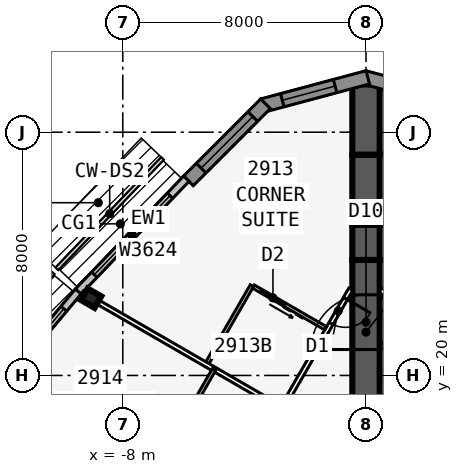
"""IFC4 building model, lengths in metres.
Left out: names, types, materials, properties, quantities, classifications, styles, units other than length and angle.
Written with IfcOpenShell. Run it as: python <this file> out.ifc"""

import sys

from ifc_helpers import new_model, si_unit, direction, frame, frame_2d, origin, origin_2d, place, context, subcontext, project, spatial, polyline, rectangle, i_section, outline, extrude, element, fill, save


model = new_model("IFC4")
c1 = context("Model", 3, precision=1e-05, world=origin(), true_north=direction((0.0, 1.0)))
c2 = subcontext(c1, "Body", "Model", "MODEL_VIEW")
j1 = project(units=[si_unit("LENGTHUNIT", "METRE"), si_unit("PLANEANGLEUNIT", "RADIAN")], contexts=[c1])
p1 = place(None, origin())
s1 = spatial("IfcSite", under=j1, at=p1, CompositionType="ELEMENT")
p2 = place(p1, origin())
s2 = spatial("IfcBuilding", under=s1, at=p2, CompositionType="ELEMENT")
p3 = place(p2, frame((0.0, 0.0, 114.7)))
s3 = spatial("IfcBuildingStorey", under=s2, at=p3, CompositionType="ELEMENT", Elevation=114.7)
p4 = place(p3, frame((0.0, 19.052, 0.0), z_axis=(0.0, 0.0, 1.0), x_axis=(0.0, 1.0, 0.0)))
e1 = element("IfcWall", 1, at=p4, inside=s3, PredefinedType="SHEAR", context=c2, shape_type="SweptSolid", body=[
    extrude(rectangle(XDim=4.746, YDim=0.9, at=frame_2d((2.373, 0.0))), origin(), (0.0, 0.0, 1.0), 3.4),
])
p5 = place(p4, frame((1.8, 0.0, 0.0)))
e2 = element("IfcOpeningElement", 2, at=p5, cuts=e1, PredefinedType="OPENING", context=c2, shape_type="SweptSolid", body=[
    extrude(rectangle(XDim=1.8, YDim=2.13, at=frame_2d((0.9, 1.065))), frame((0.0, 0.46, 0.0), z_axis=(0.0, -1.0, 0.0), x_axis=(1.0, 0.0, 0.0)), (0.0, 0.0, 1.0), 0.92),
])
p6 = place(p3, frame((0.0, 23.799, 0.0), z_axis=(0.0, 0.0, 1.0), x_axis=(0.0, 1.0, 0.0)))
e3 = element("IfcWall", 3, at=p6, inside=s3, PredefinedType="SHEAR", context=c2, shape_type="SweptSolid", body=[
    extrude(rectangle(XDim=1.155, YDim=0.9, at=frame_2d((0.577, 0.0))), origin(), (0.0, 0.0, 1.0), 3.4),
])
p7 = place(p3, frame((0.0, 24.953, 0.0), z_axis=(0.0, 0.0, 1.0), x_axis=(0.0, 1.0, 0.0)))
e4 = element("IfcWall", 4, at=p7, inside=s3, PredefinedType="SHEAR", context=c2, shape_type="SweptSolid", body=[
    extrude(rectangle(XDim=2.309, YDim=0.9, at=frame_2d((1.155, 0.0))), origin(), (0.0, 0.0, 1.0), 3.4),
])
p8 = place(p3, frame((0.0, 27.263, 0.0), z_axis=(0.0, 0.0, 1.0), x_axis=(0.0, 1.0, 0.0)))
e5 = element("IfcWall", 5, at=p8, inside=s3, PredefinedType="SHEAR", context=c2, shape_type="SweptSolid", body=[
    extrude(rectangle(XDim=2.31, YDim=0.9, at=frame_2d((1.155, 0.0))), origin(), (0.0, 0.0, 1.0), 3.4),
])
p9 = place(p3, frame((-9.041, 22.541, 0.0), z_axis=(0.0, 0.0, 1.0), x_axis=(-0.5, -0.866025403784, 0.0)))
e6 = element("IfcColumn", 6, at=p9, inside=s3, PredefinedType="COLUMN", context=c2, shape_type="SweptSolid", body=[
    extrude(i_section(OverallWidth=0.437, OverallDepth=0.513, WebThickness=0.061, FlangeThickness=0.097, at=origin_2d()), origin(), (0.0, 0.0, 1.0), 3.4),
])
p10 = place(p3, frame((3.406, 28.877, 0.0), z_axis=(0.0, 0.0, 1.0), x_axis=(-0.965924653531, 0.258823421857, 0.0)))
e7 = element("IfcWall", 7, at=p10, inside=s3, PredefinedType="SOLIDWALL", context=c2, shape_type="SweptSolid", body=[
    extrude(outline(polyline([(3.586, 0.225), (3.527, 0.225), (3.035, 0.093), (3.0, 0.225), (0.0, 0.225), (0.0, -0.225), (3.586, -0.225), (3.586, 0.225)])), origin(), (0.0, 0.0, 1.0), 3.235),
])
p11 = place(p10, frame((0.675, 0.0, 0.45)))
e8 = element("IfcOpeningElement", 8, at=p11, cuts=e7, PredefinedType="OPENING", context=c2, shape_type="SweptSolid", body=[
    extrude(rectangle(XDim=1.8, YDim=2.4, at=frame_2d((0.9, 1.2))), frame((0.0, 0.235, 0.0), z_axis=(0.0, -1.0, 0.0), x_axis=(1.0, 0.0, 0.0)), (0.0, 0.0, 1.0), 0.47),
])
p12 = place(p3, frame((0.058, 29.805, 0.0), z_axis=(0.0, 0.0, 1.0), x_axis=(-0.965924653531, -0.258823421857, 0.0)))
e9 = element("IfcWall", 9, at=p12, inside=s3, PredefinedType="SOLIDWALL", context=c2, shape_type="SweptSolid", body=[
    extrude(outline(polyline([(3.586, 0.225), (0.586, 0.225), (0.551, 0.093), (0.06, 0.225), (0.0, 0.225), (0.0, -0.225), (3.586, -0.225), (3.586, 0.225)])), origin(), (0.0, 0.0, 1.0), 3.235),
])
p13 = place(p12, frame((1.111, 0.0, 0.45)))
e10 = element("IfcOpeningElement", 10, at=p13, cuts=e9, PredefinedType="OPENING", context=c2, shape_type="SweptSolid", body=[
    extrude(rectangle(XDim=1.8, YDim=2.4, at=frame_2d((0.9, 1.2))), frame((0.0, 0.235, 0.0), z_axis=(0.0, -1.0, 0.0), x_axis=(1.0, 0.0, 0.0)), (0.0, 0.0, 1.0), 0.47),
])
p14 = place(p3, frame((-3.305, 28.935, 0.0), z_axis=(0.0, 0.0, 1.0), x_axis=(-0.707106781187, -0.707106781187, 0.0)))
e11 = element("IfcWall", 11, at=p14, inside=s3, PredefinedType="SOLIDWALL", context=c2, shape_type="SweptSolid", body=[
    extrude(rectangle(XDim=3.586, YDim=0.45, at=frame_2d((1.793, 0.0))), origin(), (0.0, 0.0, 1.0), 3.235),
])
p15 = place(p14, frame((0.593, 0.0, 0.45)))
e12 = element("IfcOpeningElement", 12, at=p15, cuts=e11, PredefinedType="OPENING", context=c2, shape_type="SweptSolid", body=[
    extrude(rectangle(XDim=2.4, YDim=2.4, at=frame_2d((1.2, 1.2))), frame((0.0, 0.235, 0.0), z_axis=(0.0, -1.0, 0.0), x_axis=(1.0, 0.0, 0.0)), (0.0, 0.0, 1.0), 0.47),
])
p16 = place(p3, frame((-5.91, 26.472, 0.0), z_axis=(0.0, 0.0, 1.0), x_axis=(-0.691719937936, -0.722165858693, 0.0)))
e13 = element("IfcWall", 13, at=p16, inside=s3, PredefinedType="STANDARD", context=c2, shape_type="SweptSolid", body=[
    extrude(rectangle(XDim=5.148, YDim=0.25, at=frame_2d((2.574, 0.0))), origin(), (0.0, 0.0, 1.0), 3.235),
])
p17 = place(p16, frame((0.774, 0.0, 0.45)))
e14 = element("IfcOpeningElement", 14, at=p17, cuts=e13, PredefinedType="OPENING", context=c2, shape_type="SweptSolid", body=[
    extrude(rectangle(XDim=3.6, YDim=2.4, at=frame_2d((1.8, 1.2))), frame((0.0, 0.135, 0.0), z_axis=(0.0, -1.0, 0.0), x_axis=(1.0, 0.0, 0.0)), (0.0, 0.0, 1.0), 0.27),
])
p18 = place(p3, frame((-9.465, 22.76, 0.0), z_axis=(0.0, 0.0, 1.0), x_axis=(-0.641810386606, -0.766863369607, 0.0)))
e15 = element("IfcWall", 15, at=p18, inside=s3, PredefinedType="STANDARD", context=c2, shape_type="SweptSolid", body=[
    extrude(rectangle(XDim=5.076, YDim=0.25, at=frame_2d((2.538, 0.0))), origin(), (0.0, 0.0, 1.0), 3.235),
])
p19 = place(p18, frame((0.738, 0.0, 0.45)))
e16 = element("IfcOpeningElement", 16, at=p19, cuts=e15, PredefinedType="OPENING", context=c2, shape_type="SweptSolid", body=[
    extrude(rectangle(XDim=3.6, YDim=2.4, at=frame_2d((1.8, 1.2))), frame((0.0, 0.135, 0.0), z_axis=(0.0, -1.0, 0.0), x_axis=(1.0, 0.0, 0.0)), (0.0, 0.0, 1.0), 0.27),
])
p20 = place(p3, frame((20.027, -10.985, 0.0), z_axis=(0.0, 0.0, 1.0), x_axis=(-0.500001677587, 0.866024435227, 0.0)))
e17 = element("IfcWall", 17, at=p20, inside=s3, PredefinedType="PARTITIONING", context=c2, shape_type="SweptSolid", body=[
    extrude(rectangle(XDim=39.054, YDim=0.15, at=frame_2d((19.527, 0.0))), origin(), (0.0, 0.0, 1.0), 3.235),
])
p21 = place(p20, frame((0.352, 0.0, 0.0)))
e18 = element("IfcOpeningElement", 18, at=p21, cuts=e17, PredefinedType="OPENING", context=c2, shape_type="SweptSolid", body=[
    extrude(rectangle(XDim=0.95, YDim=2.13, at=frame_2d((0.475, 1.065))), frame((0.0, 0.085, 0.0), z_axis=(0.0, -1.0, 0.0), x_axis=(1.0, 0.0, 0.0)), (0.0, 0.0, 1.0), 0.17),
])
p22 = place(p20, frame((7.752, 0.0, 0.0)))
e19 = element("IfcOpeningElement", 19, at=p22, cuts=e17, PredefinedType="OPENING", context=c2, shape_type="SweptSolid", body=[
    extrude(rectangle(XDim=0.95, YDim=2.13, at=frame_2d((0.475, 1.065))), frame((0.0, 0.085, 0.0), z_axis=(0.0, -1.0, 0.0), x_axis=(1.0, 0.0, 0.0)), (0.0, 0.0, 1.0), 0.17),
])
p23 = place(p20, frame((17.752, 0.0, 0.0)))
e20 = element("IfcOpeningElement", 20, at=p23, cuts=e17, PredefinedType="OPENING", context=c2, shape_type="SweptSolid", body=[
    extrude(rectangle(XDim=0.95, YDim=2.13, at=frame_2d((0.475, 1.065))), frame((0.0, 0.085, 0.0), z_axis=(0.0, -1.0, 0.0), x_axis=(1.0, 0.0, 0.0)), (0.0, 0.0, 1.0), 0.17),
])
p24 = place(p20, frame((22.152, 0.0, 0.0)))
e21 = element("IfcOpeningElement", 21, at=p24, cuts=e17, PredefinedType="OPENING", context=c2, shape_type="SweptSolid", body=[
    extrude(rectangle(XDim=0.95, YDim=2.13, at=frame_2d((0.475, 1.065))), frame((0.0, 0.085, 0.0), z_axis=(0.0, -1.0, 0.0), x_axis=(1.0, 0.0, 0.0)), (0.0, 0.0, 1.0), 0.17),
])
p25 = place(p20, frame((27.152, 0.0, 0.0)))
e22 = element("IfcOpeningElement", 22, at=p25, cuts=e17, PredefinedType="OPENING", context=c2, shape_type="SweptSolid", body=[
    extrude(rectangle(XDim=0.95, YDim=2.13, at=frame_2d((0.475, 1.065))), frame((0.0, 0.085, 0.0), z_axis=(0.0, -1.0, 0.0), x_axis=(1.0, 0.0, 0.0)), (0.0, 0.0, 1.0), 0.17),
])
p26 = place(p20, frame((36.546, 0.0, 0.0)))
e23 = element("IfcOpeningElement", 23, at=p26, cuts=e17, PredefinedType="OPENING", context=c2, shape_type="SweptSolid", body=[
    extrude(rectangle(XDim=0.95, YDim=2.13, at=frame_2d((0.475, 1.065))), frame((0.0, 0.085, 0.0), z_axis=(0.0, -1.0, 0.0), x_axis=(1.0, 0.0, 0.0)), (0.0, 0.0, 1.0), 0.17),
])
p27 = place(p3, frame((-0.5, 22.836, 0.0), z_axis=(0.0, 0.0, 1.0), x_axis=(-0.500001677587, -0.866024435227, 0.0)))
e24 = element("IfcWall", 24, at=p27, inside=s3, PredefinedType="PARTITIONING", context=c2, shape_type="SweptSolid", body=[
    extrude(rectangle(XDim=39.054, YDim=0.15, at=frame_2d((19.527, 0.0))), origin(), (0.0, 0.0, 1.0), 3.235),
])
p28 = place(p27, frame((0.352, 0.0, 0.0)))
e25 = element("IfcOpeningElement", 25, at=p28, cuts=e24, PredefinedType="OPENING", context=c2, shape_type="SweptSolid", body=[
    extrude(rectangle(XDim=0.95, YDim=2.13, at=frame_2d((0.475, 1.065))), frame((0.0, 0.085, 0.0), z_axis=(0.0, -1.0, 0.0), x_axis=(1.0, 0.0, 0.0)), (0.0, 0.0, 1.0), 0.17),
])
p29 = place(p27, frame((7.152, 0.0, 0.0)))
e26 = element("IfcOpeningElement", 26, at=p29, cuts=e24, PredefinedType="OPENING", context=c2, shape_type="SweptSolid", body=[
    extrude(rectangle(XDim=0.95, YDim=2.13, at=frame_2d((0.475, 1.065))), frame((0.0, 0.085, 0.0), z_axis=(0.0, -1.0, 0.0), x_axis=(1.0, 0.0, 0.0)), (0.0, 0.0, 1.0), 0.17),
])
p30 = place(p27, frame((12.152, 0.0, 0.0)))
e27 = element("IfcOpeningElement", 27, at=p30, cuts=e24, PredefinedType="OPENING", context=c2, shape_type="SweptSolid", body=[
    extrude(rectangle(XDim=0.95, YDim=2.13, at=frame_2d((0.475, 1.065))), frame((0.0, 0.085, 0.0), z_axis=(0.0, -1.0, 0.0), x_axis=(1.0, 0.0, 0.0)), (0.0, 0.0, 1.0), 0.17),
])
p31 = place(p27, frame((17.152, 0.0, 0.0)))
e28 = element("IfcOpeningElement", 28, at=p31, cuts=e24, PredefinedType="OPENING", context=c2, shape_type="SweptSolid", body=[
    extrude(rectangle(XDim=0.95, YDim=2.13, at=frame_2d((0.475, 1.065))), frame((0.0, 0.085, 0.0), z_axis=(0.0, -1.0, 0.0), x_axis=(1.0, 0.0, 0.0)), (0.0, 0.0, 1.0), 0.17),
])
p32 = place(p27, frame((22.752, 0.0, 0.0)))
e29 = element("IfcOpeningElement", 29, at=p32, cuts=e24, PredefinedType="OPENING", context=c2, shape_type="SweptSolid", body=[
    extrude(rectangle(XDim=0.95, YDim=2.13, at=frame_2d((0.475, 1.065))), frame((0.0, 0.085, 0.0), z_axis=(0.0, -1.0, 0.0), x_axis=(1.0, 0.0, 0.0)), (0.0, 0.0, 1.0), 0.17),
])
p33 = place(p27, frame((32.152, 0.0, 0.0)))
e30 = element("IfcOpeningElement", 30, at=p33, cuts=e24, PredefinedType="OPENING", context=c2, shape_type="SweptSolid", body=[
    extrude(rectangle(XDim=0.95, YDim=2.13, at=frame_2d((0.475, 1.065))), frame((0.0, 0.085, 0.0), z_axis=(0.0, -1.0, 0.0), x_axis=(1.0, 0.0, 0.0)), (0.0, 0.0, 1.0), 0.17),
])
p34 = place(p27, frame((37.752, 0.0, 0.0)))
e31 = element("IfcOpeningElement", 31, at=p34, cuts=e24, PredefinedType="OPENING", context=c2, shape_type="SweptSolid", body=[
    extrude(rectangle(XDim=0.95, YDim=2.13, at=frame_2d((0.475, 1.065))), frame((0.0, 0.085, 0.0), z_axis=(0.0, -1.0, 0.0), x_axis=(1.0, 0.0, 0.0)), (0.0, 0.0, 1.0), 0.17),
])
p35 = place(p3, frame((-2.829, 18.954, 0.0), z_axis=(0.0, 0.0, 1.0), x_axis=(-0.866015739374, 0.500016738876, 0.0)))
e32 = element("IfcWall", 32, at=p35, inside=s3, PredefinedType="PARTITIONING", context=c2, shape_type="SweptSolid", body=[
    extrude(rectangle(XDim=7.516, YDim=0.15, at=frame_2d((3.758, 0.0))), origin(), (0.0, 0.0, 1.0), 2.389),
])
p36 = place(p3, frame((-3.753, 22.952, 0.0), z_axis=(0.0, 0.0, 1.0), x_axis=(-0.499990139034, -0.866031096941, 0.0)))
e33 = element("IfcWall", 33, at=p36, inside=s3, PredefinedType="PLUMBINGWALL", context=c2, shape_type="SweptSolid", body=[
    extrude(rectangle(XDim=3.0, YDim=0.12, at=frame_2d((1.5, 0.0))), origin(), (0.0, 0.0, 1.0), 3.235),
])
p37 = place(p3, frame((-1.329, 21.552, 0.0), z_axis=(0.0, 0.0, 1.0), x_axis=(-0.865997131366, 0.500048966069, 0.0)))
e34 = element("IfcWall", 34, at=p37, inside=s3, PredefinedType="PLUMBINGWALL", context=c2, shape_type="SweptSolid", body=[
    extrude(rectangle(XDim=2.74, YDim=0.12, at=frame_2d((1.37, 0.0))), origin(), (0.0, 0.0, 1.0), 3.235),
])
p38 = place(p37, frame((1.55, 0.0, 0.0)))
e35 = element("IfcOpeningElement", 35, at=p38, cuts=e34, PredefinedType="OPENING", context=c2, shape_type="SweptSolid", body=[
    extrude(rectangle(XDim=0.9, YDim=2.13, at=frame_2d((0.45, 1.065))), frame((0.0, 0.07, 0.0), z_axis=(0.0, -1.0, 0.0), x_axis=(1.0, 0.0, 0.0)), (0.0, 0.0, 1.0), 0.14),
])
p39 = place(p3, frame((-4.993, 20.204, 0.0), z_axis=(0.0, 0.0, 1.0), x_axis=(-0.500033551112, -0.866006032174, 0.0)))
e36 = element("IfcWall", 36, at=p39, inside=s3, PredefinedType="PLUMBINGWALL", context=c2, shape_type="SweptSolid", body=[
    extrude(rectangle(XDim=2.4, YDim=0.12, at=frame_2d((1.2, 0.0))), origin(), (0.0, 0.0, 1.0), 3.235),
])
p40 = place(p13, origin())
e37 = element("IfcWindow", 37, at=p40, inside=s3, PartitioningType="SINGLE_PANEL", PredefinedType="WINDOW", context=c2, shape_type="SweptSolid", body=[
    extrude(rectangle(XDim=1.8, YDim=2.4, at=frame_2d((0.9, 1.2))), frame((0.0, 0.03, 0.0), z_axis=(0.0, -1.0, 0.0), x_axis=(1.0, 0.0, 0.0)), (0.0, 0.0, 1.0), 0.06),
])
fill(e10, e37)
p41 = place(p15, origin())
e38 = element("IfcWindow", 38, at=p41, inside=s3, PartitioningType="SINGLE_PANEL", PredefinedType="WINDOW", context=c2, shape_type="SweptSolid", body=[
    extrude(rectangle(XDim=2.4, YDim=2.4, at=frame_2d((1.2, 1.2))), frame((0.0, 0.03, 0.0), z_axis=(0.0, -1.0, 0.0), x_axis=(1.0, 0.0, 0.0)), (0.0, 0.0, 1.0), 0.06),
])
fill(e12, e38)
p42 = place(p17, origin())
e39 = element("IfcWindow", 39, at=p42, inside=s3, PartitioningType="SINGLE_PANEL", PredefinedType="WINDOW", context=c2, shape_type="SweptSolid", body=[
    extrude(rectangle(XDim=3.6, YDim=2.4, at=frame_2d((1.8, 1.2))), frame((0.0, 0.03, 0.0), z_axis=(0.0, -1.0, 0.0), x_axis=(1.0, 0.0, 0.0)), (0.0, 0.0, 1.0), 0.06),
])
fill(e14, e39)
p43 = place(p19, origin())
e40 = element("IfcWindow", 40, at=p43, inside=s3, PartitioningType="SINGLE_PANEL", PredefinedType="WINDOW", context=c2, shape_type="SweptSolid", body=[
    extrude(rectangle(XDim=3.6, YDim=2.4, at=frame_2d((1.8, 1.2))), frame((0.0, 0.03, 0.0), z_axis=(0.0, -1.0, 0.0), x_axis=(1.0, 0.0, 0.0)), (0.0, 0.0, 1.0), 0.06),
])
fill(e16, e40)
p44 = place(p38, origin())
e41 = element("IfcDoor", 41, at=p44, inside=s3, OperationType="SLIDING_TO_LEFT", PredefinedType="DOOR", context=c2, shape_type="SweptSolid", body=[
    extrude(rectangle(XDim=0.9, YDim=2.13, at=frame_2d((0.45, 1.065))), frame((0.0, 0.025, 0.0), z_axis=(0.0, -1.0, 0.0), x_axis=(1.0, 0.0, 0.0)), (0.0, 0.0, 1.0), 0.05),
])
fill(e35, e41)
p45 = place(p28, origin())
e42 = element("IfcDoor", 42, at=p45, inside=s3, OperationType="SINGLE_SWING_LEFT", PredefinedType="DOOR", context=c2, shape_type="SweptSolid", body=[
    extrude(rectangle(XDim=0.95, YDim=2.13, at=frame_2d((0.475, 1.065))), frame((0.0, 0.025, 0.0), z_axis=(0.0, -1.0, 0.0), x_axis=(1.0, 0.0, 0.0)), (0.0, 0.0, 1.0), 0.05),
])
fill(e25, e42)
p46 = place(p5, origin())
e43 = element("IfcDoor", 43, at=p46, inside=s3, OperationType="DOUBLE_DOOR_DOUBLE_SWING", PredefinedType="DOOR", context=c2, shape_type="SweptSolid", body=[
    extrude(rectangle(XDim=1.8, YDim=2.13, at=frame_2d((0.9, 1.065))), frame((0.0, 0.025, 0.0), z_axis=(0.0, -1.0, 0.0), x_axis=(1.0, 0.0, 0.0)), (0.0, 0.0, 1.0), 0.05),
])
fill(e2, e43)
save(model, sys.argv[1])
